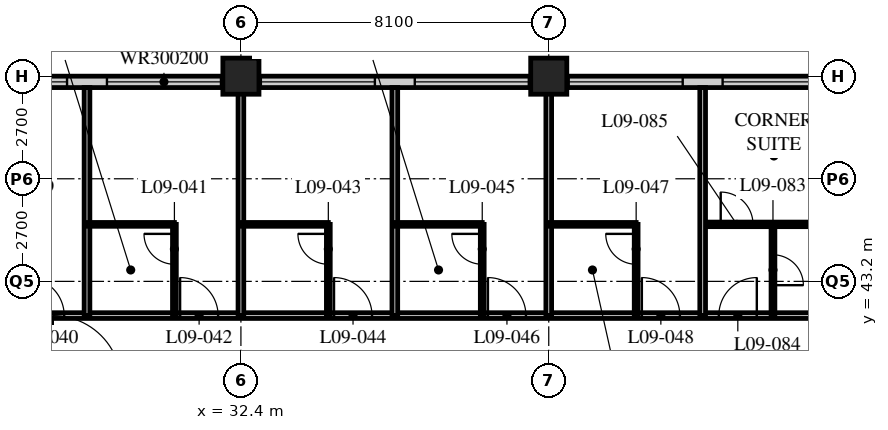
"""IFC4 building model, lengths in metres.
Left out: names, types, materials, properties, quantities, classifications, styles, units other than length and angle.
Written with IfcOpenShell. Run it as: python <this file> out.ifc"""

import sys

from ifc_helpers import new_model, si_unit, direction, frame, frame_2d, origin, origin_2d, place, context, subcontext, project, spatial, rectangle, hollow_rectangle, extrude, element, fill, save


model = new_model("IFC4")
c1 = context("Model", 3, precision=1e-05, world=origin(), true_north=direction((0.0, 1.0)))
c2 = subcontext(c1, "Body", "Model", "MODEL_VIEW")
j1 = project(units=[si_unit("LENGTHUNIT", "METRE"), si_unit("PLANEANGLEUNIT", "RADIAN")], contexts=[c1])
p1 = place(None, origin())
s1 = spatial("IfcSite", under=j1, at=p1, CompositionType="ELEMENT")
p2 = place(p1, origin())
s2 = spatial("IfcBuilding", under=s1, at=p2, CompositionType="ELEMENT")
p3 = place(p2, frame((0.0, 0.0, 43.2)))
s3 = spatial("IfcBuildingStorey", under=s2, at=p3, CompositionType="ELEMENT", Elevation=43.2)
for number, where, z_axis, x_axis in (
    (1, (32.4, 48.6, 0.0), (0.0, 0.0, 1.0), (1.0, 0.0, 0.0)),
    (2, (40.5, 48.6, 0.0), (0.0, 0.0, 1.0), (1.0, 0.0, 0.0)),
):
    element("IfcColumn", number, at=place(p3, frame(where, z_axis=z_axis, x_axis=x_axis)), inside=s3, PredefinedType="COLUMN", context=c2, shape_type="SweptSolid", body=[
        extrude(hollow_rectangle(XDim=0.95, YDim=0.95, WallThickness=0.095, at=origin_2d()), origin(), (0.0, 0.0, 1.0), 3.4),
    ])
p4 = place(p3, frame((48.3, 48.45, 0.0), z_axis=(0.0, 0.0, 1.0), x_axis=(-1.0, 0.0, 0.0)))
e3 = element("IfcWall", 3, at=p4, inside=s3, PredefinedType="SOLIDWALL", context=c2, shape_type="SweptSolid", body=[
    extrude(rectangle(XDim=40.2, YDim=0.3, at=frame_2d((20.1, 0.0))), origin(), (0.0, 0.0, 1.0), 3.19),
])
p5 = place(p4, frame((0.225, 0.0, 0.9)))
e4 = element("IfcOpeningElement", 4, at=p5, cuts=e3, PredefinedType="OPENING", context=c2, shape_type="SweptSolid", body=[
    extrude(rectangle(XDim=3.0, YDim=2.0, at=frame_2d((1.5, 1.0))), frame((0.0, 0.16, 0.0), z_axis=(0.0, -1.0, 0.0), x_axis=(1.0, 0.0, 0.0)), (0.0, 0.0, 1.0), 0.32),
])
p6 = place(p4, frame((4.275, 0.0, 0.9)))
e5 = element("IfcOpeningElement", 5, at=p6, cuts=e3, PredefinedType="OPENING", context=c2, shape_type="SweptSolid", body=[
    extrude(rectangle(XDim=3.0, YDim=2.0, at=frame_2d((1.5, 1.0))), frame((0.0, 0.16, 0.0), z_axis=(0.0, -1.0, 0.0), x_axis=(1.0, 0.0, 0.0)), (0.0, 0.0, 1.0), 0.32),
])
p7 = place(p4, frame((8.325, 0.0, 0.9)))
e6 = element("IfcOpeningElement", 6, at=p7, cuts=e3, PredefinedType="OPENING", context=c2, shape_type="SweptSolid", body=[
    extrude(rectangle(XDim=3.0, YDim=2.0, at=frame_2d((1.5, 1.0))), frame((0.0, 0.16, 0.0), z_axis=(0.0, -1.0, 0.0), x_axis=(1.0, 0.0, 0.0)), (0.0, 0.0, 1.0), 0.32),
])
p8 = place(p4, frame((12.375, 0.0, 0.9)))
e7 = element("IfcOpeningElement", 7, at=p8, cuts=e3, PredefinedType="OPENING", context=c2, shape_type="SweptSolid", body=[
    extrude(rectangle(XDim=3.0, YDim=2.0, at=frame_2d((1.5, 1.0))), frame((0.0, 0.16, 0.0), z_axis=(0.0, -1.0, 0.0), x_axis=(1.0, 0.0, 0.0)), (0.0, 0.0, 1.0), 0.32),
])
p9 = place(p4, frame((16.425, 0.0, 0.9)))
e8 = element("IfcOpeningElement", 8, at=p9, cuts=e3, PredefinedType="OPENING", context=c2, shape_type="SweptSolid", body=[
    extrude(rectangle(XDim=3.0, YDim=2.0, at=frame_2d((1.5, 1.0))), frame((0.0, 0.16, 0.0), z_axis=(0.0, -1.0, 0.0), x_axis=(1.0, 0.0, 0.0)), (0.0, 0.0, 1.0), 0.32),
])
p10 = place(p4, frame((20.475, 0.0, 0.9)))
e9 = element("IfcOpeningElement", 9, at=p10, cuts=e3, PredefinedType="OPENING", context=c2, shape_type="SweptSolid", body=[
    extrude(rectangle(XDim=3.0, YDim=2.0, at=frame_2d((1.5, 1.0))), frame((0.0, 0.16, 0.0), z_axis=(0.0, -1.0, 0.0), x_axis=(1.0, 0.0, 0.0)), (0.0, 0.0, 1.0), 0.32),
])
p11 = place(p4, frame((24.525, 0.0, 0.9)))
e10 = element("IfcOpeningElement", 10, at=p11, cuts=e3, PredefinedType="OPENING", context=c2, shape_type="SweptSolid", body=[
    extrude(rectangle(XDim=3.0, YDim=2.0, at=frame_2d((1.5, 1.0))), frame((0.0, 0.16, 0.0), z_axis=(0.0, -1.0, 0.0), x_axis=(1.0, 0.0, 0.0)), (0.0, 0.0, 1.0), 0.32),
])
p12 = place(p4, frame((28.575, 0.0, 0.9)))
e11 = element("IfcOpeningElement", 11, at=p12, cuts=e3, PredefinedType="OPENING", context=c2, shape_type="SweptSolid", body=[
    extrude(rectangle(XDim=3.0, YDim=2.0, at=frame_2d((1.5, 1.0))), frame((0.0, 0.16, 0.0), z_axis=(0.0, -1.0, 0.0), x_axis=(1.0, 0.0, 0.0)), (0.0, 0.0, 1.0), 0.32),
])
p13 = place(p4, frame((32.625, 0.0, 0.9)))
e12 = element("IfcOpeningElement", 12, at=p13, cuts=e3, PredefinedType="OPENING", context=c2, shape_type="SweptSolid", body=[
    extrude(rectangle(XDim=3.0, YDim=2.0, at=frame_2d((1.5, 1.0))), frame((0.0, 0.16, 0.0), z_axis=(0.0, -1.0, 0.0), x_axis=(1.0, 0.0, 0.0)), (0.0, 0.0, 1.0), 0.32),
])
p14 = place(p4, frame((36.675, 0.0, 0.9)))
e13 = element("IfcOpeningElement", 13, at=p14, cuts=e3, PredefinedType="OPENING", context=c2, shape_type="SweptSolid", body=[
    extrude(rectangle(XDim=3.0, YDim=2.0, at=frame_2d((1.5, 1.0))), frame((0.0, 0.16, 0.0), z_axis=(0.0, -1.0, 0.0), x_axis=(1.0, 0.0, 0.0)), (0.0, 0.0, 1.0), 0.32),
])
p15 = place(p3, frame((8.1, 42.3, 0.0), z_axis=(0.0, 0.0, 1.0), x_axis=(1.0, 0.0, 0.0)))
e14 = element("IfcWall", 14, at=p15, inside=s3, PredefinedType="PARTITIONING", context=c2, shape_type="SweptSolid", body=[
    extrude(rectangle(XDim=40.5, YDim=0.15, at=frame_2d((20.25, 0.0))), origin(), (0.0, 0.0, 1.0), 3.19),
])
p16 = place(p15, frame((6.5, 0.0, 0.0)))
e15 = element("IfcOpeningElement", 15, at=p16, cuts=e14, PredefinedType="OPENING", context=c2, shape_type="SweptSolid", body=[
    extrude(rectangle(XDim=1.0, YDim=2.1, at=frame_2d((0.5, 1.05))), frame((0.0, 0.085, 0.0), z_axis=(0.0, -1.0, 0.0), x_axis=(1.0, 0.0, 0.0)), (0.0, 0.0, 1.0), 0.17),
])
p17 = place(p15, frame((10.55, 0.0, 0.0)))
e16 = element("IfcOpeningElement", 16, at=p17, cuts=e14, PredefinedType="OPENING", context=c2, shape_type="SweptSolid", body=[
    extrude(rectangle(XDim=1.0, YDim=2.1, at=frame_2d((0.5, 1.05))), frame((0.0, 0.085, 0.0), z_axis=(0.0, -1.0, 0.0), x_axis=(1.0, 0.0, 0.0)), (0.0, 0.0, 1.0), 0.17),
])
p18 = place(p15, frame((14.6, 0.0, 0.0)))
e17 = element("IfcOpeningElement", 17, at=p18, cuts=e14, PredefinedType="OPENING", context=c2, shape_type="SweptSolid", body=[
    extrude(rectangle(XDim=1.0, YDim=2.1, at=frame_2d((0.5, 1.05))), frame((0.0, 0.085, 0.0), z_axis=(0.0, -1.0, 0.0), x_axis=(1.0, 0.0, 0.0)), (0.0, 0.0, 1.0), 0.17),
])
p19 = place(p15, frame((18.65, 0.0, 0.0)))
e18 = element("IfcOpeningElement", 18, at=p19, cuts=e14, PredefinedType="OPENING", context=c2, shape_type="SweptSolid", body=[
    extrude(rectangle(XDim=1.0, YDim=2.1, at=frame_2d((0.5, 1.05))), frame((0.0, 0.085, 0.0), z_axis=(0.0, -1.0, 0.0), x_axis=(1.0, 0.0, 0.0)), (0.0, 0.0, 1.0), 0.17),
])
p20 = place(p15, frame((22.7, 0.0, 0.0)))
e19 = element("IfcOpeningElement", 19, at=p20, cuts=e14, PredefinedType="OPENING", context=c2, shape_type="SweptSolid", body=[
    extrude(rectangle(XDim=1.0, YDim=2.1, at=frame_2d((0.5, 1.05))), frame((0.0, 0.085, 0.0), z_axis=(0.0, -1.0, 0.0), x_axis=(1.0, 0.0, 0.0)), (0.0, 0.0, 1.0), 0.17),
])
p21 = place(p15, frame((26.75, 0.0, 0.0)))
e20 = element("IfcOpeningElement", 20, at=p21, cuts=e14, PredefinedType="OPENING", context=c2, shape_type="SweptSolid", body=[
    extrude(rectangle(XDim=1.0, YDim=2.1, at=frame_2d((0.5, 1.05))), frame((0.0, 0.085, 0.0), z_axis=(0.0, -1.0, 0.0), x_axis=(1.0, 0.0, 0.0)), (0.0, 0.0, 1.0), 0.17),
])
p22 = place(p15, frame((30.8, 0.0, 0.0)))
e21 = element("IfcOpeningElement", 21, at=p22, cuts=e14, PredefinedType="OPENING", context=c2, shape_type="SweptSolid", body=[
    extrude(rectangle(XDim=1.0, YDim=2.1, at=frame_2d((0.5, 1.05))), frame((0.0, 0.085, 0.0), z_axis=(0.0, -1.0, 0.0), x_axis=(1.0, 0.0, 0.0)), (0.0, 0.0, 1.0), 0.17),
])
p23 = place(p15, frame((34.85, 0.0, 0.0)))
e22 = element("IfcOpeningElement", 22, at=p23, cuts=e14, PredefinedType="OPENING", context=c2, shape_type="SweptSolid", body=[
    extrude(rectangle(XDim=1.0, YDim=2.1, at=frame_2d((0.5, 1.05))), frame((0.0, 0.085, 0.0), z_axis=(0.0, -1.0, 0.0), x_axis=(1.0, 0.0, 0.0)), (0.0, 0.0, 1.0), 0.17),
])
p24 = place(p15, frame((36.875, 0.0, 0.0)))
e23 = element("IfcOpeningElement", 23, at=p24, cuts=e14, PredefinedType="OPENING", context=c2, shape_type="SweptSolid", body=[
    extrude(rectangle(XDim=1.0, YDim=2.1, at=frame_2d((0.5, 1.05))), frame((0.0, 0.085, 0.0), z_axis=(0.0, -1.0, 0.0), x_axis=(1.0, 0.0, 0.0)), (0.0, 0.0, 1.0), 0.17),
])
p25 = place(p15, frame((2.625, 0.0, 0.0)))
e24 = element("IfcOpeningElement", 24, at=p25, cuts=e14, PredefinedType="OPENING", context=c2, shape_type="SweptSolid", body=[
    extrude(rectangle(XDim=1.0, YDim=2.1, at=frame_2d((0.5, 1.05))), frame((0.0, 0.085, 0.0), z_axis=(0.0, -1.0, 0.0), x_axis=(1.0, 0.0, 0.0)), (0.0, 0.0, 1.0), 0.17),
])
p26 = place(p3, frame((28.35, 42.3, 0.0), z_axis=(0.0, 0.0, 1.0), x_axis=(0.0, 1.0, 0.0)))
e25 = element("IfcWall", 25, at=p26, inside=s3, PredefinedType="PARTITIONING", context=c2, shape_type="SweptSolid", body=[
    extrude(rectangle(XDim=6.0, YDim=0.15, at=frame_2d((3.0, 0.0))), origin(), (0.0, 0.0, 1.0), 3.19),
])
p27 = place(p3, frame((28.35, 44.7, 0.0), z_axis=(0.0, 0.0, 1.0), x_axis=(1.0, 0.0, 0.0)))
e26 = element("IfcWall", 26, at=p27, inside=s3, PredefinedType="PARTITIONING", context=c2, shape_type="SweptSolid", body=[
    extrude(rectangle(XDim=2.3, YDim=0.1, at=frame_2d((1.15, 0.0))), origin(), (0.0, 0.0, 1.0), 3.19),
])
p28 = place(p3, frame((30.65, 42.3, 0.0), z_axis=(0.0, 0.0, 1.0), x_axis=(0.0, 1.0, 0.0)))
e27 = element("IfcWall", 27, at=p28, inside=s3, PredefinedType="PARTITIONING", context=c2, shape_type="SweptSolid", body=[
    extrude(rectangle(XDim=2.4, YDim=0.1, at=frame_2d((1.2, 0.0))), origin(), (0.0, 0.0, 1.0), 3.19),
])
p29 = place(p28, frame((1.35, 0.0, 0.0)))
e28 = element("IfcOpeningElement", 28, at=p29, cuts=e27, PredefinedType="OPENING", context=c2, shape_type="SweptSolid", body=[
    extrude(rectangle(XDim=0.8, YDim=2.1, at=frame_2d((0.4, 1.05))), frame((0.0, 0.06, 0.0), z_axis=(0.0, -1.0, 0.0), x_axis=(1.0, 0.0, 0.0)), (0.0, 0.0, 1.0), 0.12),
])
p30 = place(p3, frame((32.4, 42.3, 0.0), z_axis=(0.0, 0.0, 1.0), x_axis=(0.0, 1.0, 0.0)))
e29 = element("IfcWall", 29, at=p30, inside=s3, PredefinedType="PARTITIONING", context=c2, shape_type="SweptSolid", body=[
    extrude(rectangle(XDim=6.0, YDim=0.15, at=frame_2d((3.0, 0.0))), origin(), (0.0, 0.0, 1.0), 2.578),
])
p31 = place(p3, frame((32.4, 44.7, 0.0), z_axis=(0.0, 0.0, 1.0), x_axis=(1.0, 0.0, 0.0)))
e30 = element("IfcWall", 30, at=p31, inside=s3, PredefinedType="PARTITIONING", context=c2, shape_type="SweptSolid", body=[
    extrude(rectangle(XDim=2.3, YDim=0.1, at=frame_2d((1.15, 0.0))), origin(), (0.0, 0.0, 1.0), 3.19),
])
p32 = place(p3, frame((34.7, 42.3, 0.0), z_axis=(0.0, 0.0, 1.0), x_axis=(0.0, 1.0, 0.0)))
e31 = element("IfcWall", 31, at=p32, inside=s3, PredefinedType="PARTITIONING", context=c2, shape_type="SweptSolid", body=[
    extrude(rectangle(XDim=2.4, YDim=0.1, at=frame_2d((1.2, 0.0))), origin(), (0.0, 0.0, 1.0), 3.19),
])
p33 = place(p32, frame((1.35, 0.0, 0.0)))
e32 = element("IfcOpeningElement", 32, at=p33, cuts=e31, PredefinedType="OPENING", context=c2, shape_type="SweptSolid", body=[
    extrude(rectangle(XDim=0.8, YDim=2.1, at=frame_2d((0.4, 1.05))), frame((0.0, 0.06, 0.0), z_axis=(0.0, -1.0, 0.0), x_axis=(1.0, 0.0, 0.0)), (0.0, 0.0, 1.0), 0.12),
])
p34 = place(p3, frame((36.45, 42.3, 0.0), z_axis=(0.0, 0.0, 1.0), x_axis=(0.0, 1.0, 0.0)))
e33 = element("IfcWall", 33, at=p34, inside=s3, PredefinedType="PARTITIONING", context=c2, shape_type="SweptSolid", body=[
    extrude(rectangle(XDim=6.0, YDim=0.15, at=frame_2d((3.0, 0.0))), origin(), (0.0, 0.0, 1.0), 3.19),
])
p35 = place(p3, frame((36.45, 44.7, 0.0), z_axis=(0.0, 0.0, 1.0), x_axis=(1.0, 0.0, 0.0)))
e34 = element("IfcWall", 34, at=p35, inside=s3, PredefinedType="PARTITIONING", context=c2, shape_type="SweptSolid", body=[
    extrude(rectangle(XDim=2.3, YDim=0.1, at=frame_2d((1.15, 0.0))), origin(), (0.0, 0.0, 1.0), 3.19),
])
p36 = place(p3, frame((38.75, 42.3, 0.0), z_axis=(0.0, 0.0, 1.0), x_axis=(0.0, 1.0, 0.0)))
e35 = element("IfcWall", 35, at=p36, inside=s3, PredefinedType="PARTITIONING", context=c2, shape_type="SweptSolid", body=[
    extrude(rectangle(XDim=2.4, YDim=0.1, at=frame_2d((1.2, 0.0))), origin(), (0.0, 0.0, 1.0), 3.19),
])
p37 = place(p36, frame((1.35, 0.0, 0.0)))
e36 = element("IfcOpeningElement", 36, at=p37, cuts=e35, PredefinedType="OPENING", context=c2, shape_type="SweptSolid", body=[
    extrude(rectangle(XDim=0.8, YDim=2.1, at=frame_2d((0.4, 1.05))), frame((0.0, 0.06, 0.0), z_axis=(0.0, -1.0, 0.0), x_axis=(1.0, 0.0, 0.0)), (0.0, 0.0, 1.0), 0.12),
])
p38 = place(p3, frame((40.5, 42.3, 0.0), z_axis=(0.0, 0.0, 1.0), x_axis=(0.0, 1.0, 0.0)))
e37 = element("IfcWall", 37, at=p38, inside=s3, PredefinedType="PARTITIONING", context=c2, shape_type="SweptSolid", body=[
    extrude(rectangle(XDim=6.0, YDim=0.15, at=frame_2d((3.0, 0.0))), origin(), (0.0, 0.0, 1.0), 2.578),
])
p39 = place(p3, frame((40.5, 44.7, 0.0), z_axis=(0.0, 0.0, 1.0), x_axis=(1.0, 0.0, 0.0)))
e38 = element("IfcWall", 38, at=p39, inside=s3, PredefinedType="PARTITIONING", context=c2, shape_type="SweptSolid", body=[
    extrude(rectangle(XDim=2.3, YDim=0.1, at=frame_2d((1.15, 0.0))), origin(), (0.0, 0.0, 1.0), 3.19),
])
p40 = place(p3, frame((42.8, 42.3, 0.0), z_axis=(0.0, 0.0, 1.0), x_axis=(0.0, 1.0, 0.0)))
e39 = element("IfcWall", 39, at=p40, inside=s3, PredefinedType="PARTITIONING", context=c2, shape_type="SweptSolid", body=[
    extrude(rectangle(XDim=2.4, YDim=0.1, at=frame_2d((1.2, 0.0))), origin(), (0.0, 0.0, 1.0), 3.19),
])
p41 = place(p40, frame((1.35, 0.0, 0.0)))
e40 = element("IfcOpeningElement", 40, at=p41, cuts=e39, PredefinedType="OPENING", context=c2, shape_type="SweptSolid", body=[
    extrude(rectangle(XDim=0.8, YDim=2.1, at=frame_2d((0.4, 1.05))), frame((0.0, 0.06, 0.0), z_axis=(0.0, -1.0, 0.0), x_axis=(1.0, 0.0, 0.0)), (0.0, 0.0, 1.0), 0.12),
])
p42 = place(p3, frame((44.55, 44.7, 0.0), z_axis=(0.0, 0.0, 1.0), x_axis=(1.0, 0.0, 0.0)))
e41 = element("IfcWall", 41, at=p42, inside=s3, PredefinedType="PARTITIONING", context=c2, shape_type="SweptSolid", body=[
    extrude(rectangle(XDim=4.05, YDim=0.12, at=frame_2d((2.025, 0.0))), origin(), (0.0, 0.0, 1.0), 3.19),
])
p43 = place(p42, frame((0.475, 0.0, 0.0)))
e42 = element("IfcOpeningElement", 42, at=p43, cuts=e41, PredefinedType="OPENING", context=c2, shape_type="SweptSolid", body=[
    extrude(rectangle(XDim=0.85, YDim=2.1, at=frame_2d((0.425, 1.05))), frame((0.0, 0.07, 0.0), z_axis=(0.0, -1.0, 0.0), x_axis=(1.0, 0.0, 0.0)), (0.0, 0.0, 1.0), 0.14),
])
p44 = place(p3, frame((46.4, 42.3, 0.0), z_axis=(0.0, 0.0, 1.0), x_axis=(0.0, 1.0, 0.0)))
e43 = element("IfcWall", 43, at=p44, inside=s3, PredefinedType="PARTITIONING", context=c2, shape_type="SweptSolid", body=[
    extrude(rectangle(XDim=2.4, YDim=0.1, at=frame_2d((1.2, 0.0))), origin(), (0.0, 0.0, 1.0), 3.19),
])
p45 = place(p44, frame((0.8, 0.0, 0.0)))
e44 = element("IfcOpeningElement", 44, at=p45, cuts=e43, PredefinedType="OPENING", context=c2, shape_type="SweptSolid", body=[
    extrude(rectangle(XDim=0.8, YDim=2.1, at=frame_2d((0.4, 1.05))), frame((0.0, 0.06, 0.0), z_axis=(0.0, -1.0, 0.0), x_axis=(1.0, 0.0, 0.0)), (0.0, 0.0, 1.0), 0.12),
])
p46 = place(p3, frame((44.55, 42.3, 0.0), z_axis=(0.0, 0.0, 1.0), x_axis=(0.0, 1.0, 0.0)))
e45 = element("IfcWall", 45, at=p46, inside=s3, PredefinedType="PARTITIONING", context=c2, shape_type="SweptSolid", body=[
    extrude(rectangle(XDim=6.0, YDim=0.15, at=frame_2d((3.0, 0.0))), origin(), (0.0, 0.0, 1.0), 3.19),
])
p47 = place(p5, origin())
e46 = element("IfcWindow", 46, at=p47, inside=s3, PartitioningType="SINGLE_PANEL", PredefinedType="WINDOW", context=c2, shape_type="SweptSolid", body=[
    extrude(rectangle(XDim=3.0, YDim=2.0, at=frame_2d((1.5, 1.0))), frame((0.0, 0.03, 0.0), z_axis=(0.0, -1.0, 0.0), x_axis=(1.0, 0.0, 0.0)), (0.0, 0.0, 1.0), 0.06),
])
fill(e4, e46)
p48 = place(p6, origin())
e47 = element("IfcWindow", 47, at=p48, inside=s3, PartitioningType="SINGLE_PANEL", PredefinedType="WINDOW", context=c2, shape_type="SweptSolid", body=[
    extrude(rectangle(XDim=3.0, YDim=2.0, at=frame_2d((1.5, 1.0))), frame((0.0, 0.03, 0.0), z_axis=(0.0, -1.0, 0.0), x_axis=(1.0, 0.0, 0.0)), (0.0, 0.0, 1.0), 0.06),
])
fill(e5, e47)
p49 = place(p7, origin())
e48 = element("IfcWindow", 48, at=p49, inside=s3, PartitioningType="SINGLE_PANEL", PredefinedType="WINDOW", context=c2, shape_type="SweptSolid", body=[
    extrude(rectangle(XDim=3.0, YDim=2.0, at=frame_2d((1.5, 1.0))), frame((0.0, 0.03, 0.0), z_axis=(0.0, -1.0, 0.0), x_axis=(1.0, 0.0, 0.0)), (0.0, 0.0, 1.0), 0.06),
])
fill(e6, e48)
p50 = place(p8, origin())
e49 = element("IfcWindow", 49, at=p50, inside=s3, PartitioningType="SINGLE_PANEL", PredefinedType="WINDOW", context=c2, shape_type="SweptSolid", body=[
    extrude(rectangle(XDim=3.0, YDim=2.0, at=frame_2d((1.5, 1.0))), frame((0.0, 0.03, 0.0), z_axis=(0.0, -1.0, 0.0), x_axis=(1.0, 0.0, 0.0)), (0.0, 0.0, 1.0), 0.06),
])
fill(e7, e49)
p51 = place(p9, origin())
e50 = element("IfcWindow", 50, at=p51, inside=s3, PartitioningType="SINGLE_PANEL", PredefinedType="WINDOW", context=c2, shape_type="SweptSolid", body=[
    extrude(rectangle(XDim=3.0, YDim=2.0, at=frame_2d((1.5, 1.0))), frame((0.0, 0.03, 0.0), z_axis=(0.0, -1.0, 0.0), x_axis=(1.0, 0.0, 0.0)), (0.0, 0.0, 1.0), 0.06),
])
fill(e8, e50)
p52 = place(p10, origin())
e51 = element("IfcWindow", 51, at=p52, inside=s3, PartitioningType="SINGLE_PANEL", PredefinedType="WINDOW", context=c2, shape_type="SweptSolid", body=[
    extrude(rectangle(XDim=3.0, YDim=2.0, at=frame_2d((1.5, 1.0))), frame((0.0, 0.03, 0.0), z_axis=(0.0, -1.0, 0.0), x_axis=(1.0, 0.0, 0.0)), (0.0, 0.0, 1.0), 0.06),
])
fill(e9, e51)
p53 = place(p19, origin())
e52 = element("IfcDoor", 52, at=p53, inside=s3, OperationType="SINGLE_SWING_LEFT", PredefinedType="DOOR", context=c2, shape_type="SweptSolid", body=[
    extrude(rectangle(XDim=1.0, YDim=2.1, at=frame_2d((0.5, 1.05))), frame((0.0, 0.025, 0.0), z_axis=(0.0, -1.0, 0.0), x_axis=(1.0, 0.0, 0.0)), (0.0, 0.0, 1.0), 0.05),
])
fill(e18, e52)
p54 = place(p29, origin())
e53 = element("IfcDoor", 53, at=p54, inside=s3, OperationType="SINGLE_SWING_RIGHT", PredefinedType="DOOR", context=c2, shape_type="SweptSolid", body=[
    extrude(rectangle(XDim=0.8, YDim=2.1, at=frame_2d((0.4, 1.05))), frame((0.0, 0.025, 0.0), z_axis=(0.0, -1.0, 0.0), x_axis=(1.0, 0.0, 0.0)), (0.0, 0.0, 1.0), 0.05),
])
fill(e28, e53)
p55 = place(p20, origin())
e54 = element("IfcDoor", 54, at=p55, inside=s3, OperationType="SINGLE_SWING_LEFT", PredefinedType="DOOR", context=c2, shape_type="SweptSolid", body=[
    extrude(rectangle(XDim=1.0, YDim=2.1, at=frame_2d((0.5, 1.05))), frame((0.0, 0.025, 0.0), z_axis=(0.0, -1.0, 0.0), x_axis=(1.0, 0.0, 0.0)), (0.0, 0.0, 1.0), 0.05),
])
fill(e19, e54)
p56 = place(p33, origin())
e55 = element("IfcDoor", 55, at=p56, inside=s3, OperationType="SINGLE_SWING_RIGHT", PredefinedType="DOOR", context=c2, shape_type="SweptSolid", body=[
    extrude(rectangle(XDim=0.8, YDim=2.1, at=frame_2d((0.4, 1.05))), frame((0.0, 0.025, 0.0), z_axis=(0.0, -1.0, 0.0), x_axis=(1.0, 0.0, 0.0)), (0.0, 0.0, 1.0), 0.05),
])
fill(e32, e55)
p57 = place(p21, origin())
e56 = element("IfcDoor", 56, at=p57, inside=s3, OperationType="SINGLE_SWING_LEFT", PredefinedType="DOOR", context=c2, shape_type="SweptSolid", body=[
    extrude(rectangle(XDim=1.0, YDim=2.1, at=frame_2d((0.5, 1.05))), frame((0.0, 0.025, 0.0), z_axis=(0.0, -1.0, 0.0), x_axis=(1.0, 0.0, 0.0)), (0.0, 0.0, 1.0), 0.05),
])
fill(e20, e56)
p58 = place(p37, origin())
e57 = element("IfcDoor", 57, at=p58, inside=s3, OperationType="SINGLE_SWING_RIGHT", PredefinedType="DOOR", context=c2, shape_type="SweptSolid", body=[
    extrude(rectangle(XDim=0.8, YDim=2.1, at=frame_2d((0.4, 1.05))), frame((0.0, 0.025, 0.0), z_axis=(0.0, -1.0, 0.0), x_axis=(1.0, 0.0, 0.0)), (0.0, 0.0, 1.0), 0.05),
])
fill(e36, e57)
p59 = place(p22, origin())
e58 = element("IfcDoor", 58, at=p59, inside=s3, OperationType="SINGLE_SWING_LEFT", PredefinedType="DOOR", context=c2, shape_type="SweptSolid", body=[
    extrude(rectangle(XDim=1.0, YDim=2.1, at=frame_2d((0.5, 1.05))), frame((0.0, 0.025, 0.0), z_axis=(0.0, -1.0, 0.0), x_axis=(1.0, 0.0, 0.0)), (0.0, 0.0, 1.0), 0.05),
])
fill(e21, e58)
p60 = place(p41, origin())
e59 = element("IfcDoor", 59, at=p60, inside=s3, OperationType="SINGLE_SWING_RIGHT", PredefinedType="DOOR", context=c2, shape_type="SweptSolid", body=[
    extrude(rectangle(XDim=0.8, YDim=2.1, at=frame_2d((0.4, 1.05))), frame((0.0, 0.025, 0.0), z_axis=(0.0, -1.0, 0.0), x_axis=(1.0, 0.0, 0.0)), (0.0, 0.0, 1.0), 0.05),
])
fill(e40, e59)
p61 = place(p23, origin())
e60 = element("IfcDoor", 60, at=p61, inside=s3, OperationType="SINGLE_SWING_LEFT", PredefinedType="DOOR", context=c2, shape_type="SweptSolid", body=[
    extrude(rectangle(XDim=1.0, YDim=2.1, at=frame_2d((0.5, 1.05))), frame((0.0, 0.025, 0.0), z_axis=(0.0, -1.0, 0.0), x_axis=(1.0, 0.0, 0.0)), (0.0, 0.0, 1.0), 0.05),
])
fill(e22, e60)
p62 = place(p45, origin())
e61 = element("IfcDoor", 61, at=p62, inside=s3, OperationType="SINGLE_SWING_RIGHT", PredefinedType="DOOR", context=c2, shape_type="SweptSolid", body=[
    extrude(rectangle(XDim=0.8, YDim=2.1, at=frame_2d((0.4, 1.05))), frame((0.0, 0.025, 0.0), z_axis=(0.0, -1.0, 0.0), x_axis=(1.0, 0.0, 0.0)), (0.0, 0.0, 1.0), 0.05),
])
fill(e44, e61)
p63 = place(p24, origin())
e62 = element("IfcDoor", 62, at=p63, inside=s3, OperationType="SINGLE_SWING_RIGHT", PredefinedType="DOOR", context=c2, shape_type="SweptSolid", body=[
    extrude(rectangle(XDim=1.0, YDim=2.1, at=frame_2d((0.5, 1.05))), frame((0.0, 0.025, 0.0), z_axis=(0.0, -1.0, 0.0), x_axis=(1.0, 0.0, 0.0)), (0.0, 0.0, 1.0), 0.05),
])
fill(e23, e62)
p64 = place(p43, origin())
e63 = element("IfcDoor", 63, at=p64, inside=s3, OperationType="SINGLE_SWING_LEFT", PredefinedType="DOOR", context=c2, shape_type="SweptSolid", body=[
    extrude(rectangle(XDim=0.85, YDim=2.1, at=frame_2d((0.425, 1.05))), frame((0.0, 0.025, 0.0), z_axis=(0.0, -1.0, 0.0), x_axis=(1.0, 0.0, 0.0)), (0.0, 0.0, 1.0), 0.05),
])
fill(e42, e63)
save(model, sys.argv[1])
